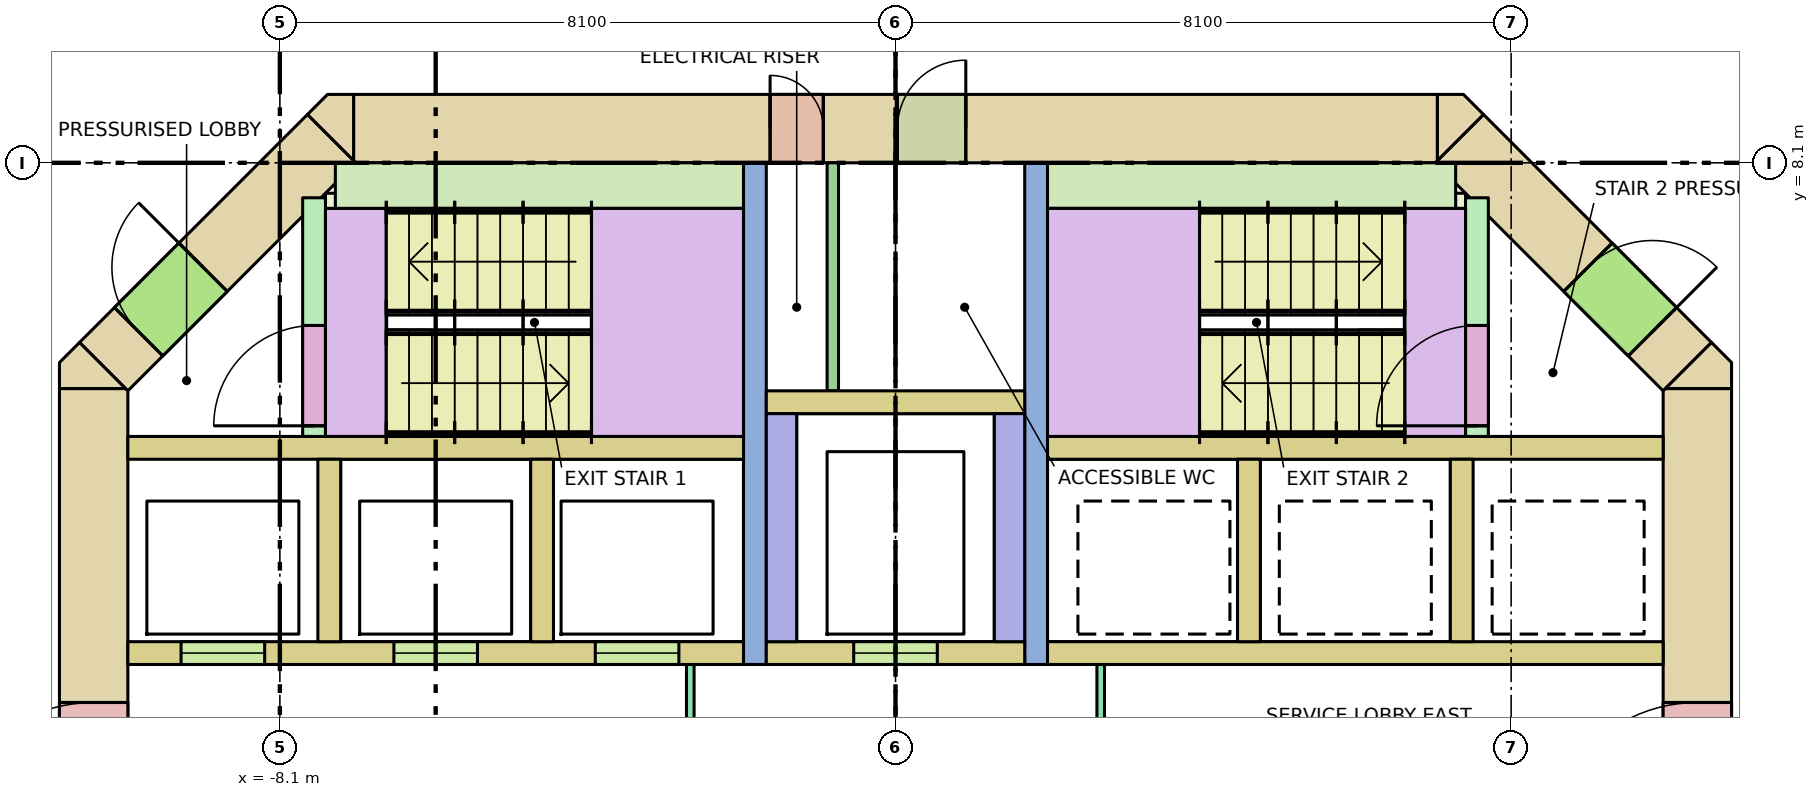
"""IFC4 building model, lengths in metres.
Left out: names, types, materials, properties, quantities, classifications, styles, units other than length and angle.
Written with IfcOpenShell. Run it as: python <this file> out.ifc"""

import sys

from ifc_helpers import new_model, si_unit, direction, frame, frame_2d, origin, place, context, subcontext, project, spatial, polyline, rectangle, outline, extrude, element, fill, save


model = new_model("IFC4")
c1 = context("Model", 3, precision=1e-05, world=origin(), true_north=direction((0.0, 1.0)))
c2 = subcontext(c1, "Body", "Model", "MODEL_VIEW")
j1 = project(units=[si_unit("LENGTHUNIT", "METRE"), si_unit("PLANEANGLEUNIT", "RADIAN")], contexts=[c1])
p1 = place(None, origin())
s1 = spatial("IfcSite", under=j1, at=p1, CompositionType="ELEMENT")
p2 = place(p1, origin())
s2 = spatial("IfcBuilding", under=s1, at=p2, CompositionType="ELEMENT")
p3 = place(p2, frame((0.0, 0.0, 20.0)))
s3 = spatial("IfcBuildingStorey", under=s2, at=p3, CompositionType="ELEMENT", Elevation=20.0)
p4 = place(p3, frame((-7.13, 8.55, -0.32), z_axis=(0.0, 0.0, 1.0), x_axis=(1.0, 0.0, 0.0)))
e1 = element("IfcWall", 1, at=p4, inside=s3, PredefinedType="SHEAR", context=c2, shape_type="SweptSolid", body=[
    extrude(rectangle(XDim=14.26, YDim=0.9, at=frame_2d((7.13, 0.0))), origin(), (0.0, 0.0, 1.0), 7.04),
])
p5 = place(p4, frame((5.48, 0.0, 0.32)))
e2 = element("IfcOpeningElement", 2, at=p5, cuts=e1, PredefinedType="OPENING", context=c2, shape_type="SweptSolid", body=[
    extrude(rectangle(XDim=0.7, YDim=2.1, at=frame_2d((0.35, 1.05))), frame((0.0, 0.46, 0.0), z_axis=(0.0, -1.0, 0.0), x_axis=(1.0, 0.0, 0.0)), (0.0, 0.0, 1.0), 0.92),
])
p6 = place(p4, frame((7.155, 0.0, 0.32)))
e3 = element("IfcOpeningElement", 3, at=p6, cuts=e1, PredefinedType="OPENING", context=c2, shape_type="SweptSolid", body=[
    extrude(rectangle(XDim=0.9, YDim=2.1, at=frame_2d((0.45, 1.05))), frame((0.0, 0.46, 0.0), z_axis=(0.0, -1.0, 0.0), x_axis=(1.0, 0.0, 0.0)), (0.0, 0.0, 1.0), 0.92),
])
p7 = place(p3, frame((-10.55, -5.13, -0.32), z_axis=(0.0, 0.0, 1.0), x_axis=(0.0, 1.0, 0.0)))
e4 = element("IfcWall", 4, at=p7, inside=s3, PredefinedType="SHEAR", context=c2, shape_type="SweptSolid", body=[
    extrude(rectangle(XDim=10.26, YDim=0.9, at=frame_2d((5.13, 0.0))), origin(), (0.0, 0.0, 1.0), 7.04),
])
p8 = place(p7, frame((4.13, 0.0, 0.32)))
e5 = element("IfcOpeningElement", 5, at=p8, cuts=e4, PredefinedType="OPENING", context=c2, shape_type="SweptSolid", body=[
    extrude(rectangle(XDim=2.0, YDim=2.1, at=frame_2d((1.0, 1.05))), frame((0.0, 0.46, 0.0), z_axis=(0.0, -1.0, 0.0), x_axis=(1.0, 0.0, 0.0)), (0.0, 0.0, 1.0), 0.92),
])
p9 = place(p3, frame((10.55, -5.13, -0.32), z_axis=(0.0, 0.0, 1.0), x_axis=(0.0, 1.0, 0.0)))
e6 = element("IfcWall", 6, at=p9, inside=s3, PredefinedType="SHEAR", context=c2, shape_type="SweptSolid", body=[
    extrude(rectangle(XDim=10.26, YDim=0.9, at=frame_2d((5.13, 0.0))), origin(), (0.0, 0.0, 1.0), 7.04),
])
p10 = place(p9, frame((4.13, 0.0, 0.32)))
e7 = element("IfcOpeningElement", 7, at=p10, cuts=e6, PredefinedType="OPENING", context=c2, shape_type="SweptSolid", body=[
    extrude(rectangle(XDim=2.0, YDim=2.1, at=frame_2d((1.0, 1.05))), frame((0.0, 0.46, 0.0), z_axis=(0.0, -1.0, 0.0), x_axis=(1.0, 0.0, 0.0)), (0.0, 0.0, 1.0), 0.92),
])
p11 = place(p3, frame((-10.418, 5.418, -0.32), z_axis=(0.0, 0.0, 1.0), x_axis=(0.707106781187, 0.707106781187, 0.0)))
e8 = element("IfcWall", 8, at=p11, inside=s3, PredefinedType="SHEAR", context=c2, shape_type="SweptSolid", body=[
    extrude(rectangle(XDim=4.243, YDim=0.9, at=frame_2d((2.121, 0.0))), origin(), (0.0, 0.0, 1.0), 7.04),
])
p12 = place(p11, frame((0.65, 0.0, 0.32)))
e9 = element("IfcOpeningElement", 9, at=p12, cuts=e8, PredefinedType="OPENING", context=c2, shape_type="SweptSolid", body=[
    extrude(rectangle(XDim=1.2, YDim=2.1, at=frame_2d((0.6, 1.05))), frame((0.0, 0.46, 0.0), z_axis=(0.0, -1.0, 0.0), x_axis=(1.0, 0.0, 0.0)), (0.0, 0.0, 1.0), 0.92),
])
p13 = place(p3, frame((7.418, 8.418, -0.32), z_axis=(0.0, 0.0, 1.0), x_axis=(0.707106781187, -0.707106781187, 0.0)))
e10 = element("IfcWall", 10, at=p13, inside=s3, PredefinedType="SHEAR", context=c2, shape_type="SweptSolid", body=[
    extrude(rectangle(XDim=4.243, YDim=0.9, at=frame_2d((2.121, 0.0))), origin(), (0.0, 0.0, 1.0), 7.04),
])
p14 = place(p13, frame((2.393, 0.0, 0.32)))
e11 = element("IfcOpeningElement", 11, at=p14, cuts=e10, PredefinedType="OPENING", context=c2, shape_type="SweptSolid", body=[
    extrude(rectangle(XDim=1.2, YDim=2.1, at=frame_2d((0.6, 1.05))), frame((0.0, 0.46, 0.0), z_axis=(0.0, -1.0, 0.0), x_axis=(1.0, 0.0, 0.0)), (0.0, 0.0, 1.0), 0.92),
])
p15 = place(p3, frame((0.0, 0.0, -0.32)))
e12 = element("IfcWall", 12, at=p15, inside=s3, PredefinedType="SHEAR", context=c2, shape_type="SweptSolid", body=[
    extrude(outline(polyline([(-10.736, 5.736), (-10.13, 5.13), (-11.0, 5.13), (-11.0, 5.473), (-10.736, 5.736)])), origin(), (0.0, 0.0, 1.0), 7.04),
])
p16 = place(p3, frame((0.0, 0.0, -0.32)))
e13 = element("IfcWall", 13, at=p16, inside=s3, PredefinedType="SHEAR", context=c2, shape_type="SweptSolid", body=[
    extrude(outline(polyline([(11.0, 5.473), (11.0, 5.13), (10.13, 5.13), (10.736, 5.736), (11.0, 5.473)])), origin(), (0.0, 0.0, 1.0), 7.04),
])
p17 = place(p3, frame((0.0, 0.0, -0.32)))
e14 = element("IfcWall", 14, at=p17, inside=s3, PredefinedType="SHEAR", context=c2, shape_type="SweptSolid", body=[
    extrude(outline(polyline([(-7.473, 9.0), (-7.13, 9.0), (-7.13, 8.13), (-7.736, 8.736), (-7.473, 9.0)])), origin(), (0.0, 0.0, 1.0), 7.04),
])
p18 = place(p3, frame((0.0, 0.0, -0.32)))
e15 = element("IfcWall", 15, at=p18, inside=s3, PredefinedType="SHEAR", context=c2, shape_type="SweptSolid", body=[
    extrude(outline(polyline([(7.473, 9.0), (7.736, 8.736), (7.13, 8.13), (7.13, 9.0), (7.473, 9.0)])), origin(), (0.0, 0.0, 1.0), 7.04),
])
for number, where, z_axis, x_axis in (
    (16, (-10.1, 4.35, 0.0), (0.0, 0.0, 1.0), (1.0, 0.0, 0.0)),
    (17, (2.0, 4.35, 0.0), (0.0, 0.0, 1.0), (1.0, 0.0, 0.0)),
):
    element("IfcWall", number, at=place(p3, frame(where, z_axis=z_axis, x_axis=x_axis)), inside=s3, PredefinedType="SOLIDWALL", context=c2, shape_type="SweptSolid", body=[
        extrude(rectangle(XDim=8.1, YDim=0.3, at=frame_2d((4.05, 0.0))), origin(), (0.0, 0.0, 1.0), 6.72),
    ])
p19 = place(p3, frame((-10.1, 1.65, 0.0), z_axis=(0.0, 0.0, 1.0), x_axis=(1.0, 0.0, 0.0)))
e18 = element("IfcWall", 18, at=p19, inside=s3, PredefinedType="SOLIDWALL", context=c2, shape_type="SweptSolid", body=[
    extrude(rectangle(XDim=8.1, YDim=0.3, at=frame_2d((4.05, 0.0))), origin(), (0.0, 0.0, 1.0), 6.72),
])
p20 = place(p19, frame((0.7, 0.0, 0.0)))
e19 = element("IfcOpeningElement", 19, at=p20, cuts=e18, PredefinedType="OPENING", context=c2, shape_type="SweptSolid", body=[
    extrude(rectangle(XDim=1.1, YDim=2.1, at=frame_2d((0.55, 1.05))), frame((0.0, 0.16, 0.0), z_axis=(0.0, -1.0, 0.0), x_axis=(1.0, 0.0, 0.0)), (0.0, 0.0, 1.0), 0.32),
])
p21 = place(p19, frame((3.5, 0.0, 0.0)))
e20 = element("IfcOpeningElement", 20, at=p21, cuts=e18, PredefinedType="OPENING", context=c2, shape_type="SweptSolid", body=[
    extrude(rectangle(XDim=1.1, YDim=2.1, at=frame_2d((0.55, 1.05))), frame((0.0, 0.16, 0.0), z_axis=(0.0, -1.0, 0.0), x_axis=(1.0, 0.0, 0.0)), (0.0, 0.0, 1.0), 0.32),
])
p22 = place(p19, frame((6.15, 0.0, 0.0)))
e21 = element("IfcOpeningElement", 21, at=p22, cuts=e18, PredefinedType="OPENING", context=c2, shape_type="SweptSolid", body=[
    extrude(rectangle(XDim=1.1, YDim=2.1, at=frame_2d((0.55, 1.05))), frame((0.0, 0.16, 0.0), z_axis=(0.0, -1.0, 0.0), x_axis=(1.0, 0.0, 0.0)), (0.0, 0.0, 1.0), 0.32),
])
p23 = place(p3, frame((2.0, 1.65, 0.0), z_axis=(0.0, 0.0, 1.0), x_axis=(1.0, 0.0, 0.0)))
e22 = element("IfcWall", 22, at=p23, inside=s3, PredefinedType="SOLIDWALL", context=c2, shape_type="SweptSolid", body=[
    extrude(rectangle(XDim=8.1, YDim=0.3, at=frame_2d((4.05, 0.0))), origin(), (0.0, 0.0, 1.0), 6.72),
])
for number, where, z_axis, x_axis in (
    (23, (-7.45, 1.8, 0.0), (0.0, 0.0, 1.0), (0.0, 1.0, 0.0)),
    (24, (-4.65, 1.8, 0.0), (0.0, 0.0, 1.0), (0.0, 1.0, 0.0)),
    (25, (4.65, 1.8, 0.0), (0.0, 0.0, 1.0), (0.0, 1.0, 0.0)),
    (26, (7.45, 1.8, 0.0), (0.0, 0.0, 1.0), (0.0, 1.0, 0.0)),
):
    element("IfcWall", number, at=place(p3, frame(where, z_axis=z_axis, x_axis=x_axis)), inside=s3, PredefinedType="SOLIDWALL", context=c2, shape_type="SweptSolid", body=[
        extrude(rectangle(XDim=2.4, YDim=0.3, at=frame_2d((1.2, 0.0))), origin(), (0.0, 0.0, 1.0), 6.72),
    ])
for number, where, z_axis, x_axis in (
    (27, (-1.85, 1.5, 0.0), (0.0, 0.0, 1.0), (0.0, 1.0, 0.0)),
    (28, (1.85, 1.5, 0.0), (0.0, 0.0, 1.0), (0.0, 1.0, 0.0)),
):
    element("IfcWall", number, at=place(p3, frame(where, z_axis=z_axis, x_axis=x_axis)), inside=s3, PredefinedType="SHEAR", context=c2, shape_type="SweptSolid", body=[
        extrude(rectangle(XDim=6.6, YDim=0.3, at=frame_2d((3.3, 0.0))), origin(), (0.0, 0.0, 1.0), 6.72),
    ])
p24 = place(p3, frame((-1.7, 1.65, 0.0), z_axis=(0.0, 0.0, 1.0), x_axis=(1.0, 0.0, 0.0)))
e29 = element("IfcWall", 29, at=p24, inside=s3, PredefinedType="SOLIDWALL", context=c2, shape_type="SweptSolid", body=[
    extrude(rectangle(XDim=3.4, YDim=0.3, at=frame_2d((1.7, 0.0))), origin(), (0.0, 0.0, 1.0), 6.72),
])
p25 = place(p24, frame((1.15, 0.0, 0.0)))
e30 = element("IfcOpeningElement", 30, at=p25, cuts=e29, PredefinedType="OPENING", context=c2, shape_type="SweptSolid", body=[
    extrude(rectangle(XDim=1.1, YDim=2.1, at=frame_2d((0.55, 1.05))), frame((0.0, 0.16, 0.0), z_axis=(0.0, -1.0, 0.0), x_axis=(1.0, 0.0, 0.0)), (0.0, 0.0, 1.0), 0.32),
])
for number, where, z_axis, x_axis in (
    (31, (-1.5, 1.8, 0.0), (0.0, 0.0, 1.0), (0.0, 1.0, 0.0)),
    (32, (1.5, 1.8, 0.0), (0.0, 0.0, 1.0), (0.0, 1.0, 0.0)),
):
    element("IfcWall", number, at=place(p3, frame(where, z_axis=z_axis, x_axis=x_axis)), inside=s3, PredefinedType="SOLIDWALL", context=c2, shape_type="SweptSolid", body=[
        extrude(rectangle(XDim=3.0, YDim=0.4, at=frame_2d((1.5, 0.0))), origin(), (0.0, 0.0, 1.0), 6.72),
    ])
p26 = place(p3, frame((-1.7, 4.95, 0.0), z_axis=(0.0, 0.0, 1.0), x_axis=(1.0, 0.0, 0.0)))
e33 = element("IfcWall", 33, at=p26, inside=s3, PredefinedType="SOLIDWALL", context=c2, shape_type="SweptSolid", body=[
    extrude(rectangle(XDim=3.4, YDim=0.3, at=frame_2d((1.7, 0.0))), origin(), (0.0, 0.0, 1.0), 6.72),
])
p27 = place(p3, frame((-7.65, 4.5, 0.0), z_axis=(0.0, 0.0, 1.0), x_axis=(0.0, 1.0, 0.0)))
e34 = element("IfcWall", 34, at=p27, inside=s3, PredefinedType="SHEAR", context=c2, shape_type="SweptSolid", body=[
    extrude(rectangle(XDim=3.14, YDim=0.3, at=frame_2d((1.57, 0.0))), origin(), (0.0, 0.0, 1.0), 6.72),
])
p28 = place(p27, frame((0.14, 0.0, 0.0)))
e35 = element("IfcOpeningElement", 35, at=p28, cuts=e34, PredefinedType="OPENING", context=c2, shape_type="SweptSolid", body=[
    extrude(rectangle(XDim=1.32, YDim=2.1, at=frame_2d((0.66, 1.05))), frame((0.0, 0.16, 0.0), z_axis=(0.0, -1.0, 0.0), x_axis=(1.0, 0.0, 0.0)), (0.0, 0.0, 1.0), 0.32),
])
p29 = place(p3, frame((-7.37, 7.8, 0.0), z_axis=(0.0, 0.0, 1.0), x_axis=(1.0, 0.0, 0.0)))
e36 = element("IfcWall", 36, at=p29, inside=s3, PredefinedType="SHEAR", context=c2, shape_type="SweptSolid", body=[
    extrude(rectangle(XDim=5.37, YDim=0.6, at=frame_2d((2.685, 0.0))), origin(), (0.0, 0.0, 1.0), 6.72),
])
p30 = place(p3, frame((7.65, 4.5, 0.0), z_axis=(0.0, 0.0, 1.0), x_axis=(0.0, 1.0, 0.0)))
e37 = element("IfcWall", 37, at=p30, inside=s3, PredefinedType="SHEAR", context=c2, shape_type="SweptSolid", body=[
    extrude(rectangle(XDim=3.14, YDim=0.3, at=frame_2d((1.57, 0.0))), origin(), (0.0, 0.0, 1.0), 6.72),
])
p31 = place(p30, frame((0.14, 0.0, 0.0)))
e38 = element("IfcOpeningElement", 38, at=p31, cuts=e37, PredefinedType="OPENING", context=c2, shape_type="SweptSolid", body=[
    extrude(rectangle(XDim=1.32, YDim=2.1, at=frame_2d((0.66, 1.05))), frame((0.0, 0.16, 0.0), z_axis=(0.0, -1.0, 0.0), x_axis=(1.0, 0.0, 0.0)), (0.0, 0.0, 1.0), 0.32),
])
p32 = place(p3, frame((2.0, 7.8, 0.0), z_axis=(0.0, 0.0, 1.0), x_axis=(1.0, 0.0, 0.0)))
e39 = element("IfcWall", 39, at=p32, inside=s3, PredefinedType="SHEAR", context=c2, shape_type="SweptSolid", body=[
    extrude(rectangle(XDim=5.37, YDim=0.6, at=frame_2d((2.685, 0.0))), origin(), (0.0, 0.0, 1.0), 6.72),
])
for number, where, z_axis, x_axis in (
    (40, (-7.5, 7.6, 0.0), (0.0, 0.0, 1.0), (1.0, 0.0, 0.0)),
    (41, (6.9, 7.6, 0.0), (0.0, 0.0, 1.0), (1.0, 0.0, 0.0)),
):
    element("IfcWall", number, at=place(p3, frame(where, z_axis=z_axis, x_axis=x_axis)), inside=s3, PredefinedType="SHEAR", context=c2, shape_type="SweptSolid", body=[
        extrude(rectangle(XDim=0.6, YDim=0.2, at=frame_2d((0.3, 0.0))), origin(), (0.0, 0.0, 1.0), 6.72),
    ])
p33 = place(p3, frame((-2.7, -1.5, 0.0), z_axis=(0.0, 0.0, 1.0), x_axis=(0.0, 1.0, 0.0)))
e42 = element("IfcWall", 42, at=p33, inside=s3, PredefinedType="PARTITIONING", context=c2, shape_type="SweptSolid", body=[
    extrude(rectangle(XDim=3.0, YDim=0.1, at=frame_2d((1.5, 0.0))), origin(), (0.0, 0.0, 1.0), 6.72),
])
p34 = place(p33, frame((0.9, 0.0, 0.0)))
e43 = element("IfcOpeningElement", 43, at=p34, cuts=e42, PredefinedType="OPENING", context=c2, shape_type="SweptSolid", body=[
    extrude(rectangle(XDim=1.2, YDim=2.1, at=frame_2d((0.6, 1.05))), frame((0.0, 0.06, 0.0), z_axis=(0.0, -1.0, 0.0), x_axis=(1.0, 0.0, 0.0)), (0.0, 0.0, 1.0), 0.12),
])
p35 = place(p3, frame((2.7, -1.5, 0.0), z_axis=(0.0, 0.0, 1.0), x_axis=(0.0, 1.0, 0.0)))
e44 = element("IfcWall", 44, at=p35, inside=s3, PredefinedType="PARTITIONING", context=c2, shape_type="SweptSolid", body=[
    extrude(rectangle(XDim=3.0, YDim=0.1, at=frame_2d((1.5, 0.0))), origin(), (0.0, 0.0, 1.0), 6.72),
])
p36 = place(p35, frame((0.9, 0.0, 0.0)))
e45 = element("IfcOpeningElement", 45, at=p36, cuts=e44, PredefinedType="OPENING", context=c2, shape_type="SweptSolid", body=[
    extrude(rectangle(XDim=1.2, YDim=2.1, at=frame_2d((0.6, 1.05))), frame((0.0, 0.06, 0.0), z_axis=(0.0, -1.0, 0.0), x_axis=(1.0, 0.0, 0.0)), (0.0, 0.0, 1.0), 0.12),
])
p37 = place(p3, frame((-0.825, 5.1, 0.0), z_axis=(0.0, 0.0, 1.0), x_axis=(0.0, 1.0, 0.0)))
e46 = element("IfcWall", 46, at=p37, inside=s3, PredefinedType="PARTITIONING", context=c2, shape_type="SweptSolid", body=[
    extrude(rectangle(XDim=3.0, YDim=0.15, at=frame_2d((1.5, 0.0))), origin(), (0.0, 0.0, 1.0), 6.72),
])
p38 = place(p20, origin())
e47 = element("IfcDoor", 47, at=p38, inside=s3, OperationType="DOUBLE_DOOR_SLIDING", PredefinedType="DOOR", context=c2, shape_type="SweptSolid", body=[
    extrude(rectangle(XDim=1.1, YDim=2.1, at=frame_2d((0.55, 1.05))), frame((0.0, 0.025, 0.0), z_axis=(0.0, -1.0, 0.0), x_axis=(1.0, 0.0, 0.0)), (0.0, 0.0, 1.0), 0.05),
])
fill(e19, e47)
p39 = place(p21, origin())
e48 = element("IfcDoor", 48, at=p39, inside=s3, OperationType="DOUBLE_DOOR_SLIDING", PredefinedType="DOOR", context=c2, shape_type="SweptSolid", body=[
    extrude(rectangle(XDim=1.1, YDim=2.1, at=frame_2d((0.55, 1.05))), frame((0.0, 0.025, 0.0), z_axis=(0.0, -1.0, 0.0), x_axis=(1.0, 0.0, 0.0)), (0.0, 0.0, 1.0), 0.05),
])
fill(e20, e48)
p40 = place(p22, origin())
e49 = element("IfcDoor", 49, at=p40, inside=s3, OperationType="DOUBLE_DOOR_SLIDING", PredefinedType="DOOR", context=c2, shape_type="SweptSolid", body=[
    extrude(rectangle(XDim=1.1, YDim=2.1, at=frame_2d((0.55, 1.05))), frame((0.0, 0.025, 0.0), z_axis=(0.0, -1.0, 0.0), x_axis=(1.0, 0.0, 0.0)), (0.0, 0.0, 1.0), 0.05),
])
fill(e21, e49)
p41 = place(p25, origin())
e50 = element("IfcDoor", 50, at=p41, inside=s3, OperationType="DOUBLE_DOOR_SLIDING", PredefinedType="DOOR", context=c2, shape_type="SweptSolid", body=[
    extrude(rectangle(XDim=1.1, YDim=2.1, at=frame_2d((0.55, 1.05))), frame((0.0, 0.025, 0.0), z_axis=(0.0, -1.0, 0.0), x_axis=(1.0, 0.0, 0.0)), (0.0, 0.0, 1.0), 0.05),
])
fill(e30, e50)
p42 = place(p28, origin())
e51 = element("IfcDoor", 51, at=p42, inside=s3, OperationType="DOUBLE_DOOR_SINGLE_SWING", PredefinedType="DOOR", context=c2, shape_type="SweptSolid", body=[
    extrude(rectangle(XDim=1.32, YDim=2.1, at=frame_2d((0.66, 1.05))), frame((0.0, 0.025, 0.0), z_axis=(0.0, -1.0, 0.0), x_axis=(1.0, 0.0, 0.0)), (0.0, 0.0, 1.0), 0.05),
])
fill(e35, e51)
p43 = place(p12, origin())
e52 = element("IfcDoor", 52, at=p43, inside=s3, OperationType="SINGLE_SWING_RIGHT", PredefinedType="DOOR", context=c2, shape_type="SweptSolid", body=[
    extrude(rectangle(XDim=1.2, YDim=2.1, at=frame_2d((0.6, 1.05))), frame((0.0, 0.025, 0.0), z_axis=(0.0, -1.0, 0.0), x_axis=(1.0, 0.0, 0.0)), (0.0, 0.0, 1.0), 0.05),
])
fill(e9, e52)
p44 = place(p31, origin())
e53 = element("IfcDoor", 53, at=p44, inside=s3, OperationType="DOUBLE_DOOR_SINGLE_SWING", PredefinedType="DOOR", context=c2, shape_type="SweptSolid", body=[
    extrude(rectangle(XDim=1.32, YDim=2.1, at=frame_2d((0.66, 1.05))), frame((0.0, 0.025, 0.0), z_axis=(0.0, -1.0, 0.0), x_axis=(1.0, 0.0, 0.0)), (0.0, 0.0, 1.0), 0.05),
])
fill(e38, e53)
p45 = place(p14, origin())
e54 = element("IfcDoor", 54, at=p45, inside=s3, OperationType="SINGLE_SWING_RIGHT", PredefinedType="DOOR", context=c2, shape_type="SweptSolid", body=[
    extrude(rectangle(XDim=1.2, YDim=2.1, at=frame_2d((0.6, 1.05))), frame((0.0, 0.025, 0.0), z_axis=(0.0, -1.0, 0.0), x_axis=(1.0, 0.0, 0.0)), (0.0, 0.0, 1.0), 0.05),
])
fill(e11, e54)
p46 = place(p8, origin())
e55 = element("IfcDoor", 55, at=p46, inside=s3, OperationType="DOUBLE_DOOR_SINGLE_SWING", PredefinedType="DOOR", context=c2, shape_type="SweptSolid", body=[
    extrude(rectangle(XDim=2.0, YDim=2.1, at=frame_2d((1.0, 1.05))), frame((0.0, 0.025, 0.0), z_axis=(0.0, -1.0, 0.0), x_axis=(1.0, 0.0, 0.0)), (0.0, 0.0, 1.0), 0.05),
])
fill(e5, e55)
p47 = place(p10, origin())
e56 = element("IfcDoor", 56, at=p47, inside=s3, OperationType="DOUBLE_DOOR_SINGLE_SWING", PredefinedType="DOOR", context=c2, shape_type="SweptSolid", body=[
    extrude(rectangle(XDim=2.0, YDim=2.1, at=frame_2d((1.0, 1.05))), frame((0.0, 0.025, 0.0), z_axis=(0.0, -1.0, 0.0), x_axis=(1.0, 0.0, 0.0)), (0.0, 0.0, 1.0), 0.05),
])
fill(e7, e56)
p48 = place(p5, origin())
e57 = element("IfcDoor", 57, at=p48, inside=s3, OperationType="SINGLE_SWING_LEFT", PredefinedType="DOOR", context=c2, shape_type="SweptSolid", body=[
    extrude(rectangle(XDim=0.7, YDim=2.1, at=frame_2d((0.35, 1.05))), frame((0.0, 0.025, 0.0), z_axis=(0.0, -1.0, 0.0), x_axis=(1.0, 0.0, 0.0)), (0.0, 0.0, 1.0), 0.05),
])
fill(e2, e57)
p49 = place(p6, origin())
e58 = element("IfcDoor", 58, at=p49, inside=s3, OperationType="SINGLE_SWING_RIGHT", PredefinedType="DOOR", context=c2, shape_type="SweptSolid", body=[
    extrude(rectangle(XDim=0.9, YDim=2.1, at=frame_2d((0.45, 1.05))), frame((0.0, 0.025, 0.0), z_axis=(0.0, -1.0, 0.0), x_axis=(1.0, 0.0, 0.0)), (0.0, 0.0, 1.0), 0.05),
])
fill(e3, e58)
save(model, sys.argv[1])
